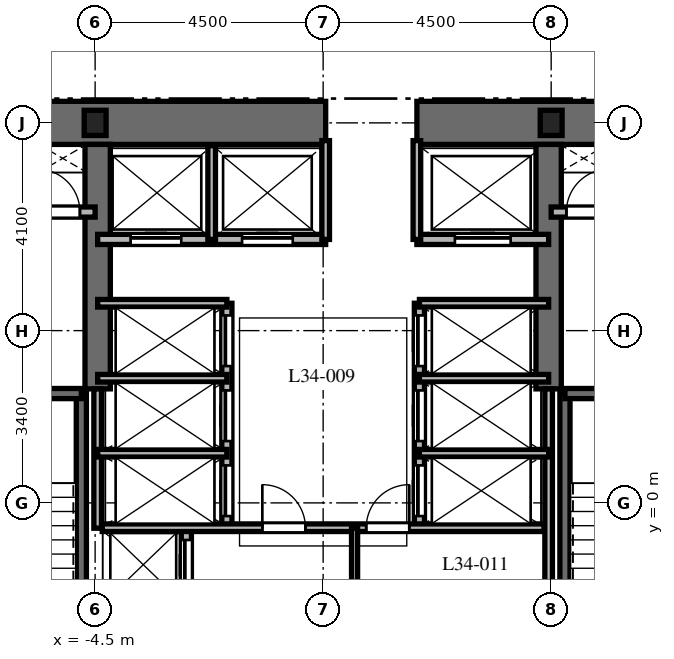
"""IFC4 building model, lengths in metres.
Left out: names, types, materials, properties, quantities, classifications, styles, units other than length and angle.
Written with IfcOpenShell. Run it as: python <this file> out.ifc"""

import sys

from ifc_helpers import new_model, si_unit, direction, frame, frame_2d, origin, origin_2d, place, context, subcontext, project, spatial, rectangle, i_section, extrude, element, fill, save


model = new_model("IFC4")
c1 = context("Model", 3, precision=1e-05, world=origin(), true_north=direction((0.0, 1.0)))
c2 = subcontext(c1, "Body", "Model", "MODEL_VIEW")
j1 = project(units=[si_unit("LENGTHUNIT", "METRE"), si_unit("PLANEANGLEUNIT", "RADIAN")], contexts=[c1])
p1 = place(None, origin())
s1 = spatial("IfcSite", under=j1, at=p1, CompositionType="ELEMENT")
p2 = place(p1, origin())
s2 = spatial("IfcBuilding", under=s1, at=p2, CompositionType="ELEMENT")
p3 = place(p2, frame((0.0, 0.0, 139.5)))
s3 = spatial("IfcBuildingStorey", under=s2, at=p3, CompositionType="ELEMENT", Elevation=139.5)
p4 = place(p3, frame((-9.425, 7.5, 0.0), z_axis=(0.0, 0.0, 1.0), x_axis=(1.0, 0.0, 0.0)))
e1 = element("IfcWall", 1, at=p4, inside=s3, PredefinedType="SHEAR", context=c2, shape_type="SweptSolid", body=[
    extrude(rectangle(XDim=9.475, YDim=0.85, at=frame_2d((4.738, 0.0))), origin(), (0.0, 0.0, 1.0), 4.8),
])
p5 = place(p3, frame((1.85, 7.5, 0.0), z_axis=(0.0, 0.0, 1.0), x_axis=(1.0, 0.0, 0.0)))
e2 = element("IfcWall", 2, at=p5, inside=s3, PredefinedType="SHEAR", context=c2, shape_type="SweptSolid", body=[
    extrude(rectangle(XDim=7.575, YDim=0.85, at=frame_2d((3.788, 0.0))), origin(), (0.0, 0.0, 1.0), 4.8),
])
for number, where, z_axis, x_axis in (
    (3, (-4.45, 2.25, 0.0), (0.0, 0.0, 1.0), (0.0, 1.0, 0.0)),
    (4, (4.45, 2.25, 0.0), (0.0, 0.0, 1.0), (0.0, 1.0, 0.0)),
):
    element("IfcWall", number, at=place(p3, frame(where, z_axis=z_axis, x_axis=x_axis)), inside=s3, PredefinedType="SHEAR", context=c2, shape_type="SweptSolid", body=[
        extrude(rectangle(XDim=4.825, YDim=0.5, at=frame_2d((2.413, 0.0))), origin(), (0.0, 0.0, 1.0), 4.8),
    ])
p6 = place(p3, frame((-4.772, -6.985, 0.0), z_axis=(0.0, 0.0, 1.0), x_axis=(0.0, 1.0, 0.0)))
e5 = element("IfcWall", 5, at=p6, inside=s3, PredefinedType="SHEAR", context=c2, shape_type="SweptSolid", body=[
    extrude(rectangle(XDim=9.143, YDim=0.2, at=frame_2d((4.572, 0.0))), origin(), (0.0, 0.0, 1.0), 4.8),
])
p7 = place(p3, frame((-8.458, 2.158, 0.0), z_axis=(0.0, 0.0, 1.0), x_axis=(1.0, 0.0, 0.0)))
e6 = element("IfcWall", 6, at=p7, inside=s3, PredefinedType="SHEAR", context=c2, shape_type="SweptSolid", body=[
    extrude(rectangle(XDim=3.686, YDim=0.2, at=frame_2d((1.843, 0.0))), origin(), (0.0, 0.0, 1.0), 4.8),
])
p8 = place(p7, frame((1.3, 0.0, 0.0)))
e7 = element("IfcOpeningElement", 7, at=p8, cuts=e6, PredefinedType="OPENING", context=c2, shape_type="SweptSolid", body=[
    extrude(rectangle(XDim=1.0, YDim=2.15, at=frame_2d((0.5, 1.075))), frame((0.0, 0.11, 0.0), z_axis=(0.0, -1.0, 0.0), x_axis=(1.0, 0.0, 0.0)), (0.0, 0.0, 1.0), 0.22),
])
p9 = place(p3, frame((4.772, -6.985, 0.0), z_axis=(0.0, 0.0, 1.0), x_axis=(0.0, 1.0, 0.0)))
e8 = element("IfcWall", 8, at=p9, inside=s3, PredefinedType="SHEAR", context=c2, shape_type="SweptSolid", body=[
    extrude(rectangle(XDim=9.143, YDim=0.2, at=frame_2d((4.572, 0.0))), origin(), (0.0, 0.0, 1.0), 4.8),
])
p10 = place(p3, frame((4.772, 2.158, 0.0), z_axis=(0.0, 0.0, 1.0), x_axis=(1.0, 0.0, 0.0)))
e9 = element("IfcWall", 9, at=p10, inside=s3, PredefinedType="SHEAR", context=c2, shape_type="SweptSolid", body=[
    extrude(rectangle(XDim=3.686, YDim=0.2, at=frame_2d((1.843, 0.0))), origin(), (0.0, 0.0, 1.0), 4.8),
])
p11 = place(p10, frame((1.35, 0.0, 0.0)))
e10 = element("IfcOpeningElement", 10, at=p11, cuts=e9, PredefinedType="OPENING", context=c2, shape_type="SweptSolid", body=[
    extrude(rectangle(XDim=1.0, YDim=2.15, at=frame_2d((0.5, 1.075))), frame((0.0, 0.11, 0.0), z_axis=(0.0, -1.0, 0.0), x_axis=(1.0, 0.0, 0.0)), (0.0, 0.0, 1.0), 0.22),
])
for number, where, z_axis, x_axis in (
    (11, (4.5, 7.5, 0.0), (0.0, 0.0, 1.0), (1.0, 0.0, 0.0)),
    (12, (-4.5, 7.5, 0.0), (0.0, 0.0, 1.0), (1.0, 0.0, 0.0)),
):
    element("IfcColumn", number, at=place(p3, frame(where, z_axis=z_axis, x_axis=x_axis)), inside=s3, PredefinedType="COLUMN", context=c2, shape_type="SweptSolid", body=[
        extrude(i_section(OverallWidth=0.432, OverallDepth=0.498, WebThickness=0.056, FlangeThickness=0.089, at=origin_2d()), origin(), (0.0, 0.0, 1.0), 4.8),
    ])
p12 = place(p3, frame((-8.55, 5.74, 0.0), z_axis=(0.0, 0.0, 1.0), x_axis=(1.0, 0.0, 0.0)))
e13 = element("IfcWall", 13, at=p12, inside=s3, PredefinedType="PARTITIONING", context=c2, shape_type="SweptSolid", body=[
    extrude(rectangle(XDim=4.05, YDim=0.2, at=frame_2d((2.025, 0.0))), origin(), (0.0, 0.0, 1.0), 4.5),
])
p13 = place(p12, frame((0.75, 0.0, 0.0)))
e14 = element("IfcOpeningElement", 14, at=p13, cuts=e13, PredefinedType="OPENING", context=c2, shape_type="SweptSolid", body=[
    extrude(rectangle(XDim=1.1, YDim=2.2, at=frame_2d((0.55, 1.1))), frame((0.0, 0.11, 0.0), z_axis=(0.0, -1.0, 0.0), x_axis=(1.0, 0.0, 0.0)), (0.0, 0.0, 1.0), 0.22),
])
p14 = place(p12, frame((2.9, 0.0, 0.0)))
e15 = element("IfcOpeningElement", 15, at=p14, cuts=e13, PredefinedType="OPENING", context=c2, shape_type="SweptSolid", body=[
    extrude(rectangle(XDim=0.85, YDim=2.03, at=frame_2d((0.425, 1.015))), frame((0.0, 0.11, 0.0), z_axis=(0.0, -1.0, 0.0), x_axis=(1.0, 0.0, 0.0)), (0.0, 0.0, 1.0), 0.22),
])
p15 = place(p3, frame((4.5, 5.74, 0.0), z_axis=(0.0, 0.0, 1.0), x_axis=(1.0, 0.0, 0.0)))
e16 = element("IfcWall", 16, at=p15, inside=s3, PredefinedType="PARTITIONING", context=c2, shape_type="SweptSolid", body=[
    extrude(rectangle(XDim=4.05, YDim=0.2, at=frame_2d((2.025, 0.0))), origin(), (0.0, 0.0, 1.0), 4.5),
])
p16 = place(p15, frame((0.3, 0.0, 0.0)))
e17 = element("IfcOpeningElement", 17, at=p16, cuts=e16, PredefinedType="OPENING", context=c2, shape_type="SweptSolid", body=[
    extrude(rectangle(XDim=0.85, YDim=2.03, at=frame_2d((0.425, 1.015))), frame((0.0, 0.11, 0.0), z_axis=(0.0, -1.0, 0.0), x_axis=(1.0, 0.0, 0.0)), (0.0, 0.0, 1.0), 0.22),
])
p17 = place(p15, frame((2.15, 0.0, 0.0)))
e18 = element("IfcOpeningElement", 18, at=p17, cuts=e16, PredefinedType="OPENING", context=c2, shape_type="SweptSolid", body=[
    extrude(rectangle(XDim=1.1, YDim=2.2, at=frame_2d((0.55, 1.1))), frame((0.0, 0.11, 0.0), z_axis=(0.0, -1.0, 0.0), x_axis=(1.0, 0.0, 0.0)), (0.0, 0.0, 1.0), 0.22),
])
p18 = place(p3, frame((-2.7, -1.972, 0.0), z_axis=(0.0, 0.0, 1.0), x_axis=(0.0, 1.0, 0.0)))
e19 = element("IfcWall", 19, at=p18, inside=s3, PredefinedType="PARTITIONING", context=c2, shape_type="SweptSolid", body=[
    extrude(rectangle(XDim=1.472, YDim=0.2, at=frame_2d((0.736, 0.0))), origin(), (0.0, 0.0, 1.0), 4.5),
])
p19 = place(p18, frame((0.24, 0.0, 0.0)))
e20 = element("IfcOpeningElement", 20, at=p19, cuts=e19, PredefinedType="OPENING", context=c2, shape_type="SweptSolid", body=[
    extrude(rectangle(XDim=1.0, YDim=2.2, at=frame_2d((0.5, 1.1))), frame((0.0, 0.11, 0.0), z_axis=(0.0, -1.0, 0.0), x_axis=(1.0, 0.0, 0.0)), (0.0, 0.0, 1.0), 0.22),
])
p20 = place(p3, frame((-4.45, 5.2, 0.0), z_axis=(0.0, 0.0, 1.0), x_axis=(1.0, 0.0, 0.0)))
e21 = element("IfcWall", 21, at=p20, inside=s3, PredefinedType="PARTITIONING", context=c2, shape_type="SweptSolid", body=[
    extrude(rectangle(XDim=4.5, YDim=0.2, at=frame_2d((2.25, 0.0))), origin(), (0.0, 0.0, 1.0), 4.5),
])
p21 = place(p20, frame((0.65, 0.0, 0.0)))
e22 = element("IfcOpeningElement", 22, at=p21, cuts=e21, PredefinedType="OPENING", context=c2, shape_type="SweptSolid", body=[
    extrude(rectangle(XDim=1.0, YDim=2.2, at=frame_2d((0.5, 1.1))), frame((0.0, 0.11, 0.0), z_axis=(0.0, -1.0, 0.0), x_axis=(1.0, 0.0, 0.0)), (0.0, 0.0, 1.0), 0.22),
])
p22 = place(p20, frame((2.85, 0.0, 0.0)))
e23 = element("IfcOpeningElement", 23, at=p22, cuts=e21, PredefinedType="OPENING", context=c2, shape_type="SweptSolid", body=[
    extrude(rectangle(XDim=1.0, YDim=2.2, at=frame_2d((0.5, 1.1))), frame((0.0, 0.11, 0.0), z_axis=(0.0, -1.0, 0.0), x_axis=(1.0, 0.0, 0.0)), (0.0, 0.0, 1.0), 0.22),
])
p23 = place(p3, frame((1.85, 5.2, 0.0), z_axis=(0.0, 0.0, 1.0), x_axis=(1.0, 0.0, 0.0)))
e24 = element("IfcWall", 24, at=p23, inside=s3, PredefinedType="PARTITIONING", context=c2, shape_type="SweptSolid", body=[
    extrude(rectangle(XDim=2.6, YDim=0.2, at=frame_2d((1.3, 0.0))), origin(), (0.0, 0.0, 1.0), 4.5),
])
p24 = place(p23, frame((0.75, 0.0, 0.0)))
e25 = element("IfcOpeningElement", 25, at=p24, cuts=e24, PredefinedType="OPENING", context=c2, shape_type="SweptSolid", body=[
    extrude(rectangle(XDim=1.1, YDim=2.2, at=frame_2d((0.55, 1.1))), frame((0.0, 0.11, 0.0), z_axis=(0.0, -1.0, 0.0), x_axis=(1.0, 0.0, 0.0)), (0.0, 0.0, 1.0), 0.22),
])
p25 = place(p3, frame((-2.2, 5.2, 0.0), z_axis=(0.0, 0.0, 1.0), x_axis=(0.0, 1.0, 0.0)))
e26 = element("IfcWall", 26, at=p25, inside=s3, PredefinedType="PARTITIONING", context=c2, shape_type="SweptSolid", body=[
    extrude(rectangle(XDim=1.85, YDim=0.15, at=frame_2d((0.925, 0.0))), origin(), (0.0, 0.0, 1.0), 4.5),
])
for number, where, z_axis, x_axis in (
    (27, (0.05, 5.2, 0.0), (0.0, 0.0, 1.0), (0.0, 1.0, 0.0)),
    (28, (1.85, 5.2, 0.0), (0.0, 0.0, 1.0), (0.0, 1.0, 0.0)),
):
    element("IfcWall", number, at=place(p3, frame(where, z_axis=z_axis, x_axis=x_axis)), inside=s3, PredefinedType="PARTITIONING", context=c2, shape_type="SweptSolid", body=[
        extrude(rectangle(XDim=1.95, YDim=0.15, at=frame_2d((0.975, 0.0))), origin(), (0.0, 0.0, 1.0), 4.5),
    ])
p26 = place(p3, frame((-4.45, -0.5, 0.0), z_axis=(0.0, 0.0, 1.0), x_axis=(0.0, 1.0, 0.0)))
e29 = element("IfcWall", 29, at=p26, inside=s3, PredefinedType="PARTITIONING", context=c2, shape_type="SweptSolid", body=[
    extrude(rectangle(XDim=2.75, YDim=0.15, at=frame_2d((1.375, 0.0))), origin(), (0.0, 0.0, 1.0), 4.5),
])
p27 = place(p3, frame((4.45, -1.972, 0.0), z_axis=(0.0, 0.0, 1.0), x_axis=(0.0, 1.0, 0.0)))
e30 = element("IfcWall", 30, at=p27, inside=s3, PredefinedType="PARTITIONING", context=c2, shape_type="SweptSolid", body=[
    extrude(rectangle(XDim=4.222, YDim=0.15, at=frame_2d((2.111, 0.0))), origin(), (0.0, 0.0, 1.0), 4.5),
])
p28 = place(p3, frame((-1.9, -0.5, 0.0), z_axis=(0.0, 0.0, 1.0), x_axis=(0.0, 1.0, 0.0)))
e31 = element("IfcWall", 31, at=p28, inside=s3, PredefinedType="PARTITIONING", context=c2, shape_type="SweptSolid", body=[
    extrude(rectangle(XDim=4.44, YDim=0.2, at=frame_2d((2.22, 0.0))), origin(), (0.0, 0.0, 1.0), 4.5),
])
p29 = place(p28, frame((0.24, 0.0, 0.0)))
e32 = element("IfcOpeningElement", 32, at=p29, cuts=e31, PredefinedType="OPENING", context=c2, shape_type="SweptSolid", body=[
    extrude(rectangle(XDim=1.0, YDim=2.2, at=frame_2d((0.5, 1.1))), frame((0.0, 0.11, 0.0), z_axis=(0.0, -1.0, 0.0), x_axis=(1.0, 0.0, 0.0)), (0.0, 0.0, 1.0), 0.22),
])
p30 = place(p28, frame((1.72, 0.0, 0.0)))
e33 = element("IfcOpeningElement", 33, at=p30, cuts=e31, PredefinedType="OPENING", context=c2, shape_type="SweptSolid", body=[
    extrude(rectangle(XDim=1.0, YDim=2.2, at=frame_2d((0.5, 1.1))), frame((0.0, 0.11, 0.0), z_axis=(0.0, -1.0, 0.0), x_axis=(1.0, 0.0, 0.0)), (0.0, 0.0, 1.0), 0.22),
])
p31 = place(p28, frame((3.2, 0.0, 0.0)))
e34 = element("IfcOpeningElement", 34, at=p31, cuts=e31, PredefinedType="OPENING", context=c2, shape_type="SweptSolid", body=[
    extrude(rectangle(XDim=1.0, YDim=2.2, at=frame_2d((0.5, 1.1))), frame((0.0, 0.11, 0.0), z_axis=(0.0, -1.0, 0.0), x_axis=(1.0, 0.0, 0.0)), (0.0, 0.0, 1.0), 0.22),
])
for number, where, z_axis, x_axis in (
    (35, (-4.45, 3.94, 0.0), (0.0, 0.0, 1.0), (1.0, 0.0, 0.0)),
    (36, (-4.45, 0.98, 0.0), (0.0, 0.0, 1.0), (1.0, 0.0, 0.0)),
    (37, (-4.45, 2.46, 0.0), (0.0, 0.0, 1.0), (1.0, 0.0, 0.0)),
):
    element("IfcWall", number, at=place(p3, frame(where, z_axis=z_axis, x_axis=x_axis)), inside=s3, PredefinedType="PARTITIONING", context=c2, shape_type="SweptSolid", body=[
        extrude(rectangle(XDim=2.55, YDim=0.15, at=frame_2d((1.275, 0.0))), origin(), (0.0, 0.0, 1.0), 4.5),
    ])
p32 = place(p3, frame((1.9, -0.5, 0.0), z_axis=(0.0, 0.0, 1.0), x_axis=(0.0, 1.0, 0.0)))
e38 = element("IfcWall", 38, at=p32, inside=s3, PredefinedType="PARTITIONING", context=c2, shape_type="SweptSolid", body=[
    extrude(rectangle(XDim=4.44, YDim=0.2, at=frame_2d((2.22, 0.0))), origin(), (0.0, 0.0, 1.0), 4.5),
])
p33 = place(p32, frame((0.24, 0.0, 0.0)))
e39 = element("IfcOpeningElement", 39, at=p33, cuts=e38, PredefinedType="OPENING", context=c2, shape_type="SweptSolid", body=[
    extrude(rectangle(XDim=1.0, YDim=2.2, at=frame_2d((0.5, 1.1))), frame((0.0, 0.11, 0.0), z_axis=(0.0, -1.0, 0.0), x_axis=(1.0, 0.0, 0.0)), (0.0, 0.0, 1.0), 0.22),
])
p34 = place(p32, frame((1.72, 0.0, 0.0)))
e40 = element("IfcOpeningElement", 40, at=p34, cuts=e38, PredefinedType="OPENING", context=c2, shape_type="SweptSolid", body=[
    extrude(rectangle(XDim=1.0, YDim=2.2, at=frame_2d((0.5, 1.1))), frame((0.0, 0.11, 0.0), z_axis=(0.0, -1.0, 0.0), x_axis=(1.0, 0.0, 0.0)), (0.0, 0.0, 1.0), 0.22),
])
p35 = place(p32, frame((3.2, 0.0, 0.0)))
e41 = element("IfcOpeningElement", 41, at=p35, cuts=e38, PredefinedType="OPENING", context=c2, shape_type="SweptSolid", body=[
    extrude(rectangle(XDim=1.0, YDim=2.2, at=frame_2d((0.5, 1.1))), frame((0.0, 0.11, 0.0), z_axis=(0.0, -1.0, 0.0), x_axis=(1.0, 0.0, 0.0)), (0.0, 0.0, 1.0), 0.22),
])
for number, where, z_axis, x_axis in (
    (42, (1.9, 3.94, 0.0), (0.0, 0.0, 1.0), (1.0, 0.0, 0.0)),
    (43, (1.9, 0.98, 0.0), (0.0, 0.0, 1.0), (1.0, 0.0, 0.0)),
    (44, (1.9, 2.46, 0.0), (0.0, 0.0, 1.0), (1.0, 0.0, 0.0)),
):
    element("IfcWall", number, at=place(p3, frame(where, z_axis=z_axis, x_axis=x_axis)), inside=s3, PredefinedType="PARTITIONING", context=c2, shape_type="SweptSolid", body=[
        extrude(rectangle(XDim=2.55, YDim=0.15, at=frame_2d((1.275, 0.0))), origin(), (0.0, 0.0, 1.0), 4.5),
    ])
p36 = place(p3, frame((-4.36, -0.49, 0.0), z_axis=(0.0, 0.0, 1.0), x_axis=(1.0, 0.0, 0.0)))
e45 = element("IfcWall", 45, at=p36, inside=s3, PredefinedType="PARTITIONING", context=c2, shape_type="SweptSolid", body=[
    extrude(rectangle(XDim=8.72, YDim=0.15, at=frame_2d((4.36, 0.0))), origin(), (0.0, 0.0, 1.0), 4.5),
])
p37 = place(p36, frame((3.16, 0.0, 0.0)))
e46 = element("IfcOpeningElement", 46, at=p37, cuts=e45, PredefinedType="OPENING", context=c2, shape_type="SweptSolid", body=[
    extrude(rectangle(XDim=0.85, YDim=2.03, at=frame_2d((0.425, 1.015))), frame((0.0, 0.085, 0.0), z_axis=(0.0, -1.0, 0.0), x_axis=(1.0, 0.0, 0.0)), (0.0, 0.0, 1.0), 0.17),
])
p38 = place(p36, frame((5.21, 0.0, 0.0)))
e47 = element("IfcOpeningElement", 47, at=p38, cuts=e45, PredefinedType="OPENING", context=c2, shape_type="SweptSolid", body=[
    extrude(rectangle(XDim=0.85, YDim=2.03, at=frame_2d((0.425, 1.015))), frame((0.0, 0.085, 0.0), z_axis=(0.0, -1.0, 0.0), x_axis=(1.0, 0.0, 0.0)), (0.0, 0.0, 1.0), 0.17),
])
p39 = place(p3, frame((0.62, -1.972, 0.0), z_axis=(0.0, 0.0, 1.0), x_axis=(0.0, 1.0, 0.0)))
e48 = element("IfcWall", 48, at=p39, inside=s3, PredefinedType="PARTITIONING", context=c2, shape_type="SweptSolid", body=[
    extrude(rectangle(XDim=1.472, YDim=0.12, at=frame_2d((0.736, 0.0))), origin(), (0.0, 0.0, 1.0), 4.5),
])
p40 = place(p14, origin())
e49 = element("IfcDoor", 49, at=p40, inside=s3, OperationType="SINGLE_SWING_LEFT", PredefinedType="DOOR", context=c2, shape_type="SweptSolid", body=[
    extrude(rectangle(XDim=0.85, YDim=2.03, at=frame_2d((0.425, 1.015))), frame((0.0, 0.025, 0.0), z_axis=(0.0, -1.0, 0.0), x_axis=(1.0, 0.0, 0.0)), (0.0, 0.0, 1.0), 0.05),
])
fill(e15, e49)
p41 = place(p16, origin())
e50 = element("IfcDoor", 50, at=p41, inside=s3, OperationType="SINGLE_SWING_RIGHT", PredefinedType="DOOR", context=c2, shape_type="SweptSolid", body=[
    extrude(rectangle(XDim=0.85, YDim=2.03, at=frame_2d((0.425, 1.015))), frame((0.0, 0.025, 0.0), z_axis=(0.0, -1.0, 0.0), x_axis=(1.0, 0.0, 0.0)), (0.0, 0.0, 1.0), 0.05),
])
fill(e17, e50)
p42 = place(p19, origin())
e51 = element("IfcDoor", 51, at=p42, inside=s3, OperationType="SLIDING_TO_LEFT", PredefinedType="DOOR", context=c2, shape_type="SweptSolid", body=[
    extrude(rectangle(XDim=1.0, YDim=2.2, at=frame_2d((0.5, 1.1))), frame((0.0, 0.025, 0.0), z_axis=(0.0, -1.0, 0.0), x_axis=(1.0, 0.0, 0.0)), (0.0, 0.0, 1.0), 0.05),
])
fill(e20, e51)
p43 = place(p21, origin())
e52 = element("IfcDoor", 52, at=p43, inside=s3, OperationType="SLIDING_TO_LEFT", PredefinedType="DOOR", context=c2, shape_type="SweptSolid", body=[
    extrude(rectangle(XDim=1.0, YDim=2.2, at=frame_2d((0.5, 1.1))), frame((0.0, 0.025, 0.0), z_axis=(0.0, -1.0, 0.0), x_axis=(1.0, 0.0, 0.0)), (0.0, 0.0, 1.0), 0.05),
])
fill(e22, e52)
p44 = place(p22, origin())
e53 = element("IfcDoor", 53, at=p44, inside=s3, OperationType="SLIDING_TO_RIGHT", PredefinedType="DOOR", context=c2, shape_type="SweptSolid", body=[
    extrude(rectangle(XDim=1.0, YDim=2.2, at=frame_2d((0.5, 1.1))), frame((0.0, 0.025, 0.0), z_axis=(0.0, -1.0, 0.0), x_axis=(1.0, 0.0, 0.0)), (0.0, 0.0, 1.0), 0.05),
])
fill(e23, e53)
p45 = place(p24, origin())
e54 = element("IfcDoor", 54, at=p45, inside=s3, OperationType="SLIDING_TO_RIGHT", PredefinedType="DOOR", context=c2, shape_type="SweptSolid", body=[
    extrude(rectangle(XDim=1.1, YDim=2.2, at=frame_2d((0.55, 1.1))), frame((0.0, 0.025, 0.0), z_axis=(0.0, -1.0, 0.0), x_axis=(1.0, 0.0, 0.0)), (0.0, 0.0, 1.0), 0.05),
])
fill(e25, e54)
p46 = place(p29, origin())
e55 = element("IfcDoor", 55, at=p46, inside=s3, OperationType="SLIDING_TO_LEFT", PredefinedType="DOOR", context=c2, shape_type="SweptSolid", body=[
    extrude(rectangle(XDim=1.0, YDim=2.2, at=frame_2d((0.5, 1.1))), frame((0.0, 0.025, 0.0), z_axis=(0.0, -1.0, 0.0), x_axis=(1.0, 0.0, 0.0)), (0.0, 0.0, 1.0), 0.05),
])
fill(e32, e55)
p47 = place(p30, origin())
e56 = element("IfcDoor", 56, at=p47, inside=s3, OperationType="SLIDING_TO_LEFT", PredefinedType="DOOR", context=c2, shape_type="SweptSolid", body=[
    extrude(rectangle(XDim=1.0, YDim=2.2, at=frame_2d((0.5, 1.1))), frame((0.0, 0.025, 0.0), z_axis=(0.0, -1.0, 0.0), x_axis=(1.0, 0.0, 0.0)), (0.0, 0.0, 1.0), 0.05),
])
fill(e33, e56)
p48 = place(p31, origin())
e57 = element("IfcDoor", 57, at=p48, inside=s3, OperationType="SLIDING_TO_LEFT", PredefinedType="DOOR", context=c2, shape_type="SweptSolid", body=[
    extrude(rectangle(XDim=1.0, YDim=2.2, at=frame_2d((0.5, 1.1))), frame((0.0, 0.025, 0.0), z_axis=(0.0, -1.0, 0.0), x_axis=(1.0, 0.0, 0.0)), (0.0, 0.0, 1.0), 0.05),
])
fill(e34, e57)
p49 = place(p33, origin())
e58 = element("IfcDoor", 58, at=p49, inside=s3, OperationType="SLIDING_TO_RIGHT", PredefinedType="DOOR", context=c2, shape_type="SweptSolid", body=[
    extrude(rectangle(XDim=1.0, YDim=2.2, at=frame_2d((0.5, 1.1))), frame((0.0, 0.025, 0.0), z_axis=(0.0, -1.0, 0.0), x_axis=(1.0, 0.0, 0.0)), (0.0, 0.0, 1.0), 0.05),
])
fill(e39, e58)
p50 = place(p34, origin())
e59 = element("IfcDoor", 59, at=p50, inside=s3, OperationType="SLIDING_TO_RIGHT", PredefinedType="DOOR", context=c2, shape_type="SweptSolid", body=[
    extrude(rectangle(XDim=1.0, YDim=2.2, at=frame_2d((0.5, 1.1))), frame((0.0, 0.025, 0.0), z_axis=(0.0, -1.0, 0.0), x_axis=(1.0, 0.0, 0.0)), (0.0, 0.0, 1.0), 0.05),
])
fill(e40, e59)
p51 = place(p35, origin())
e60 = element("IfcDoor", 60, at=p51, inside=s3, OperationType="SLIDING_TO_RIGHT", PredefinedType="DOOR", context=c2, shape_type="SweptSolid", body=[
    extrude(rectangle(XDim=1.0, YDim=2.2, at=frame_2d((0.5, 1.1))), frame((0.0, 0.025, 0.0), z_axis=(0.0, -1.0, 0.0), x_axis=(1.0, 0.0, 0.0)), (0.0, 0.0, 1.0), 0.05),
])
fill(e41, e60)
p52 = place(p37, origin())
e61 = element("IfcDoor", 61, at=p52, inside=s3, OperationType="SINGLE_SWING_LEFT", PredefinedType="DOOR", context=c2, shape_type="SweptSolid", body=[
    extrude(rectangle(XDim=0.85, YDim=2.03, at=frame_2d((0.425, 1.015))), frame((0.0, 0.025, 0.0), z_axis=(0.0, -1.0, 0.0), x_axis=(1.0, 0.0, 0.0)), (0.0, 0.0, 1.0), 0.05),
])
fill(e46, e61)
p53 = place(p38, origin())
e62 = element("IfcDoor", 62, at=p53, inside=s3, OperationType="SINGLE_SWING_RIGHT", PredefinedType="DOOR", context=c2, shape_type="SweptSolid", body=[
    extrude(rectangle(XDim=0.85, YDim=2.03, at=frame_2d((0.425, 1.015))), frame((0.0, 0.025, 0.0), z_axis=(0.0, -1.0, 0.0), x_axis=(1.0, 0.0, 0.0)), (0.0, 0.0, 1.0), 0.05),
])
fill(e47, e62)
save(model, sys.argv[1])
